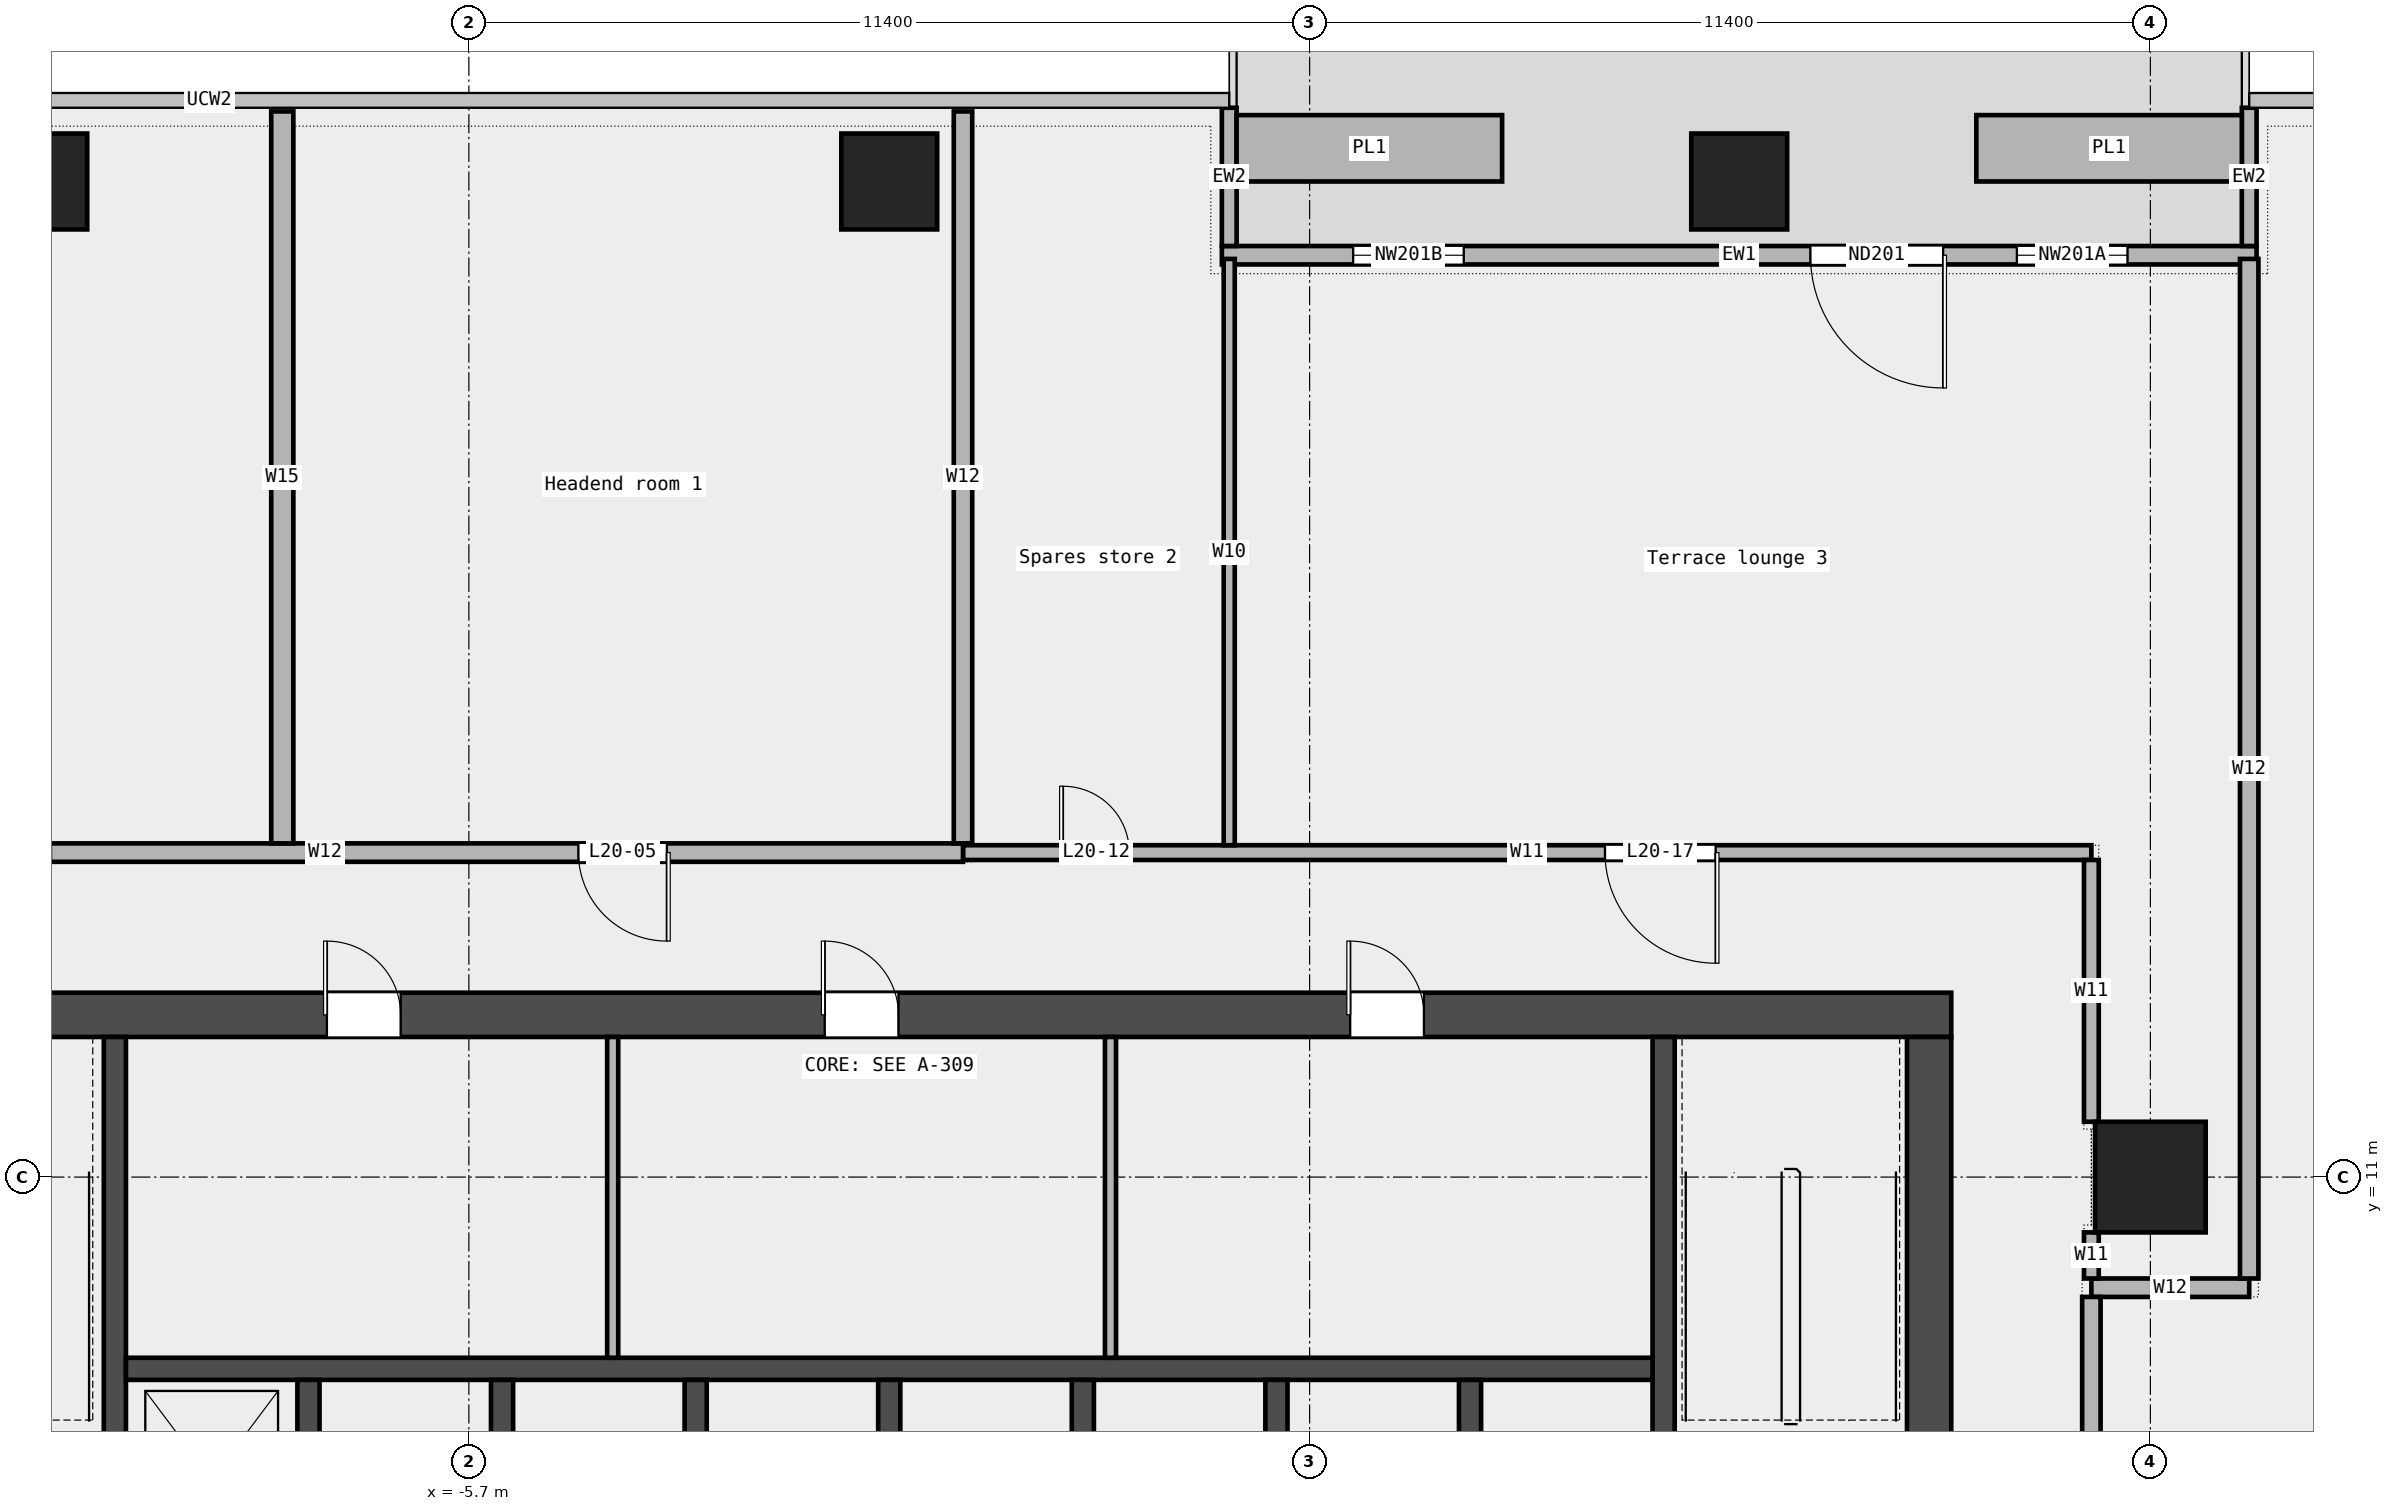
"""IFC4 building model, lengths in metres.
Left out: names, types, materials, properties, quantities, classifications, styles, units other than length and angle.
Written with IfcOpenShell. Run it as: python <this file> out.ifc"""

import sys

from ifc_helpers import new_model, si_unit, direction, frame, frame_2d, origin, origin_2d, place, context, subcontext, project, spatial, rectangle, extrude, element, fill, save


model = new_model("IFC4")
c1 = context("Model", 3, precision=1e-05, world=origin(), true_north=direction((0.0, 1.0)))
c2 = subcontext(c1, "Body", "Model", "MODEL_VIEW")
j1 = project(units=[si_unit("LENGTHUNIT", "METRE"), si_unit("PLANEANGLEUNIT", "RADIAN")], contexts=[c1])
p1 = place(None, origin())
s1 = spatial("IfcSite", under=j1, at=p1, CompositionType="ELEMENT")
p2 = place(p1, origin())
s2 = spatial("IfcBuilding", under=s1, at=p2, CompositionType="ELEMENT")
p3 = place(p2, frame((0.0, 0.0, 103.6)))
s3 = spatial("IfcBuildingStorey", under=s2, at=p3, CompositionType="ELEMENT", Elevation=103.6)
for number, where, z_axis, x_axis in (
    (1, (11.525, 24.5, 0.0), (0.0, 0.0, 1.0), (1.0, 0.0, 0.0)),
    (2, (0.0, 24.5, 0.0), (0.0, 0.0, 1.0), (1.0, 0.0, 0.0)),
    (3, (-11.525, 24.5, 0.0), (0.0, 0.0, 1.0), (1.0, 0.0, 0.0)),
):
    element("IfcColumn", number, at=place(p3, frame(where, z_axis=z_axis, x_axis=x_axis)), inside=s3, PredefinedType="COLUMN", context=c2, shape_type="SweptSolid", body=[
        extrude(rectangle(XDim=1.3, YDim=1.3, at=origin_2d()), origin(), (0.0, 0.0, 1.0), 4.05),
    ])
p4 = place(p3, frame((17.1, 11.0, 0.0), z_axis=(0.0, 0.0, 1.0), x_axis=(1.0, 0.0, 0.0)))
e4 = element("IfcColumn", 4, at=p4, inside=s3, PredefinedType="COLUMN", context=c2, shape_type="SweptSolid", body=[
    extrude(rectangle(XDim=1.5, YDim=1.5, at=origin_2d()), origin(), (0.0, 0.0, 1.0), 4.05),
])
p5 = place(p3, frame((18.54, 23.5, 0.0), z_axis=(0.0, 0.0, 1.0), x_axis=(-1.0, 0.0, 0.0)))
e5 = element("IfcWall", 5, at=p5, inside=s3, PredefinedType="STANDARD", context=c2, shape_type="SweptSolid", body=[
    extrude(rectangle(XDim=14.03, YDim=0.25, at=frame_2d((7.015, 0.0))), origin(), (0.0, 0.0, 1.0), 4.05),
])
p6 = place(p5, frame((1.75, 0.0, 0.45)))
e6 = element("IfcOpeningElement", 6, at=p6, cuts=e5, PredefinedType="OPENING", context=c2, shape_type="SweptSolid", body=[
    extrude(rectangle(XDim=1.5, YDim=3.0, at=frame_2d((0.75, 1.5))), frame((0.0, 0.137, 0.0), z_axis=(0.0, -1.0, 0.0), x_axis=(1.0, 0.0, 0.0)), (0.0, 0.0, 1.0), 0.274),
])
p7 = place(p5, frame((4.25, 0.0, 0.0)))
e7 = element("IfcOpeningElement", 7, at=p7, cuts=e5, PredefinedType="OPENING", context=c2, shape_type="SweptSolid", body=[
    extrude(rectangle(XDim=1.8, YDim=2.4, at=frame_2d((0.9, 1.2))), frame((0.0, 0.137, 0.0), z_axis=(0.0, -1.0, 0.0), x_axis=(1.0, 0.0, 0.0)), (0.0, 0.0, 1.0), 0.274),
])
p8 = place(p5, frame((10.75, 0.0, 0.45)))
e8 = element("IfcOpeningElement", 8, at=p8, cuts=e5, PredefinedType="OPENING", context=c2, shape_type="SweptSolid", body=[
    extrude(rectangle(XDim=1.5, YDim=3.0, at=frame_2d((0.75, 1.5))), frame((0.0, 0.137, 0.0), z_axis=(0.0, -1.0, 0.0), x_axis=(1.0, 0.0, 0.0)), (0.0, 0.0, 1.0), 0.274),
])
for number, where, z_axis, x_axis in (
    (9, (18.44, 25.5, 0.0), (0.0, 0.0, 1.0), (0.0, -1.0, 0.0)),
    (10, (4.61, 25.5, 0.0), (0.0, 0.0, 1.0), (0.0, -1.0, 0.0)),
):
    element("IfcWall", number, at=place(p3, frame(where, z_axis=z_axis, x_axis=x_axis)), inside=s3, PredefinedType="STANDARD", context=c2, shape_type="SweptSolid", body=[
        extrude(rectangle(XDim=1.875, YDim=0.2, at=frame_2d((0.938, 0.0))), origin(), (0.0, 0.0, 1.0), 4.05),
    ])
for number, where, z_axis, x_axis in (
    (11, (18.34, 24.95, 0.0), (0.0, 0.0, 1.0), (-1.0, 0.0, 0.0)),
    (12, (8.31, 24.95, 0.0), (0.0, 0.0, 1.0), (-1.0, 0.0, 0.0)),
):
    element("IfcWall", number, at=place(p3, frame(where, z_axis=z_axis, x_axis=x_axis)), inside=s3, PredefinedType="STANDARD", context=c2, shape_type="SweptSolid", body=[
        extrude(rectangle(XDim=3.6, YDim=0.9, at=frame_2d((1.8, 0.0))), origin(), (0.0, 0.0, 1.0), 0.7),
    ])
p9 = place(p3, frame((16.3, 9.5, 0.0), z_axis=(0.0, 0.0, 1.0), x_axis=(1.0, 0.0, 0.0)))
e13 = element("IfcWall", 13, at=p9, inside=s3, PredefinedType="PARTITIONING", context=c2, shape_type="SweptSolid", body=[
    extrude(rectangle(XDim=2.14, YDim=0.25, at=frame_2d((1.07, 0.0))), origin(), (0.0, 0.0, 1.0), 4.05),
])
p10 = place(p3, frame((1.0, 15.4, 0.0), z_axis=(0.0, 0.0, 1.0), x_axis=(1.0, 0.0, 0.0)))
e14 = element("IfcWall", 14, at=p10, inside=s3, PredefinedType="PARTITIONING", context=c2, shape_type="SweptSolid", body=[
    extrude(rectangle(XDim=15.3, YDim=0.2, at=frame_2d((7.65, 0.0))), origin(), (0.0, 0.0, 1.0), 4.05),
])
p11 = place(p10, frame((1.355, 0.0, 0.0)))
e15 = element("IfcOpeningElement", 15, at=p11, cuts=e14, PredefinedType="OPENING", context=c2, shape_type="SweptSolid", body=[
    extrude(rectangle(XDim=0.9, YDim=2.1, at=frame_2d((0.45, 1.05))), frame((0.0, 0.112, 0.0), z_axis=(0.0, -1.0, 0.0), x_axis=(1.0, 0.0, 0.0)), (0.0, 0.0, 1.0), 0.224),
])
p12 = place(p10, frame((8.705, 0.0, 0.0)))
e16 = element("IfcOpeningElement", 16, at=p12, cuts=e14, PredefinedType="OPENING", context=c2, shape_type="SweptSolid", body=[
    extrude(rectangle(XDim=1.5, YDim=2.1, at=frame_2d((0.75, 1.05))), frame((0.0, 0.112, 0.0), z_axis=(0.0, -1.0, 0.0), x_axis=(1.0, 0.0, 0.0)), (0.0, 0.0, 1.0), 0.224),
])
p13 = place(p3, frame((-16.3, 15.4, 0.0), z_axis=(0.0, 0.0, 1.0), x_axis=(1.0, 0.0, 0.0)))
e17 = element("IfcWall", 17, at=p13, inside=s3, PredefinedType="PARTITIONING", context=c2, shape_type="SweptSolid", body=[
    extrude(rectangle(XDim=17.3, YDim=0.25, at=frame_2d((8.65, 0.0))), origin(), (0.0, 0.0, 1.0), 4.05),
])
p14 = place(p13, frame((12.085, 0.0, 0.0)))
e18 = element("IfcOpeningElement", 18, at=p14, cuts=e17, PredefinedType="OPENING", context=c2, shape_type="SweptSolid", body=[
    extrude(rectangle(XDim=1.2, YDim=2.1, at=frame_2d((0.6, 1.05))), frame((0.0, 0.137, 0.0), z_axis=(0.0, -1.0, 0.0), x_axis=(1.0, 0.0, 0.0)), (0.0, 0.0, 1.0), 0.274),
])
p15 = place(p13, frame((3.135, 0.0, 0.0)))
e19 = element("IfcOpeningElement", 19, at=p15, cuts=e17, PredefinedType="OPENING", context=c2, shape_type="SweptSolid", body=[
    extrude(rectangle(XDim=1.8, YDim=2.1, at=frame_2d((0.9, 1.05))), frame((0.0, 0.137, 0.0), z_axis=(0.0, -1.0, 0.0), x_axis=(1.0, 0.0, 0.0)), (0.0, 0.0, 1.0), 0.274),
])
p16 = place(p3, frame((-8.23, 15.525, 0.0), z_axis=(0.0, 0.0, 1.0), x_axis=(0.0, 1.0, 0.0)))
e20 = element("IfcWall", 20, at=p16, inside=s3, PredefinedType="PARTITIONING", context=c2, shape_type="SweptSolid", body=[
    extrude(rectangle(XDim=9.925, YDim=0.3, at=frame_2d((4.962, 0.0))), origin(), (0.0, 0.0, 1.0), 4.05),
])
p17 = place(p3, frame((1.0, 15.525, 0.0), z_axis=(0.0, 0.0, 1.0), x_axis=(0.0, 1.0, 0.0)))
e21 = element("IfcWall", 21, at=p17, inside=s3, PredefinedType="PARTITIONING", context=c2, shape_type="SweptSolid", body=[
    extrude(rectangle(XDim=9.925, YDim=0.25, at=frame_2d((4.962, 0.0))), origin(), (0.0, 0.0, 1.0), 4.05),
])
p18 = place(p3, frame((4.61, 15.5, 0.0), z_axis=(0.0, 0.0, 1.0), x_axis=(0.0, 1.0, 0.0)))
e22 = element("IfcWall", 22, at=p18, inside=s3, PredefinedType="PARTITIONING", context=c2, shape_type="SweptSolid", body=[
    extrude(rectangle(XDim=7.95, YDim=0.15, at=frame_2d((3.975, 0.0))), origin(), (0.0, 0.0, 1.0), 4.05),
])
p19 = place(p3, frame((16.3, 9.625, 0.0), z_axis=(0.0, 0.0, 1.0), x_axis=(0.0, 1.0, 0.0)))
e23 = element("IfcWall", 23, at=p19, inside=s3, PredefinedType="PARTITIONING", context=c2, shape_type="SweptSolid", body=[
    extrude(rectangle(XDim=0.625, YDim=0.2, at=frame_2d((0.312, 0.0))), origin(), (0.0, 0.0, 1.0), 4.05),
])
p20 = place(p3, frame((16.3, 11.75, 0.0), z_axis=(0.0, 0.0, 1.0), x_axis=(0.0, 1.0, 0.0)))
e24 = element("IfcWall", 24, at=p20, inside=s3, PredefinedType="PARTITIONING", context=c2, shape_type="SweptSolid", body=[
    extrude(rectangle(XDim=3.55, YDim=0.2, at=frame_2d((1.775, 0.0))), origin(), (0.0, 0.0, 1.0), 4.05),
])
p21 = place(p3, frame((16.3, 1.525, 0.0), z_axis=(0.0, 0.0, 1.0), x_axis=(0.0, 1.0, 0.0)))
e25 = element("IfcWall", 25, at=p21, inside=s3, PredefinedType="PARTITIONING", context=c2, shape_type="SweptSolid", body=[
    extrude(rectangle(XDim=7.85, YDim=0.25, at=frame_2d((3.925, 0.0))), origin(), (0.0, 0.0, 1.0), 4.05),
])
p22 = place(p21, frame((2.538, 0.0, 0.0)))
e26 = element("IfcOpeningElement", 26, at=p22, cuts=e25, PredefinedType="OPENING", context=c2, shape_type="SweptSolid", body=[
    extrude(rectangle(XDim=1.8, YDim=2.1, at=frame_2d((0.9, 1.05))), frame((0.0, 0.137, 0.0), z_axis=(0.0, -1.0, 0.0), x_axis=(1.0, 0.0, 0.0)), (0.0, 0.0, 1.0), 0.274),
])
p23 = place(p3, frame((18.44, 9.625, 0.0), z_axis=(0.0, 0.0, 1.0), x_axis=(0.0, 1.0, 0.0)))
e27 = element("IfcWall", 27, at=p23, inside=s3, PredefinedType="PARTITIONING", context=c2, shape_type="SweptSolid", body=[
    extrude(rectangle(XDim=13.825, YDim=0.25, at=frame_2d((6.913, 0.0))), origin(), (0.0, 0.0, 1.0), 4.05),
])
p24 = place(p3, frame((-14.4, 13.2, 0.0), z_axis=(0.0, 0.0, 1.0), x_axis=(1.0, 0.0, 0.0)))
e28 = element("IfcWall", 28, at=p24, inside=s3, PredefinedType="SHEAR", context=c2, shape_type="SweptSolid", body=[
    extrude(rectangle(XDim=28.8, YDim=0.6, at=frame_2d((14.4, 0.0))), origin(), (0.0, 0.0, 1.0), 4.2),
])
p25 = place(p24, frame((6.775, 0.0, 0.0)))
e29 = element("IfcOpeningElement", 29, at=p25, cuts=e28, PredefinedType="OPENING", context=c2, shape_type="SweptSolid", body=[
    extrude(rectangle(XDim=1.0, YDim=2.1, at=frame_2d((0.5, 1.05))), frame((0.0, 0.312, 0.0), z_axis=(0.0, -1.0, 0.0), x_axis=(1.0, 0.0, 0.0)), (0.0, 0.0, 1.0), 0.624),
])
p26 = place(p24, frame((13.525, 0.0, 0.0)))
e30 = element("IfcOpeningElement", 30, at=p26, cuts=e28, PredefinedType="OPENING", context=c2, shape_type="SweptSolid", body=[
    extrude(rectangle(XDim=1.0, YDim=2.1, at=frame_2d((0.5, 1.05))), frame((0.0, 0.312, 0.0), z_axis=(0.0, -1.0, 0.0), x_axis=(1.0, 0.0, 0.0)), (0.0, 0.0, 1.0), 0.624),
])
p27 = place(p24, frame((20.65, 0.0, 0.0)))
e31 = element("IfcOpeningElement", 31, at=p27, cuts=e28, PredefinedType="OPENING", context=c2, shape_type="SweptSolid", body=[
    extrude(rectangle(XDim=1.0, YDim=2.1, at=frame_2d((0.5, 1.05))), frame((0.0, 0.312, 0.0), z_axis=(0.0, -1.0, 0.0), x_axis=(1.0, 0.0, 0.0)), (0.0, 0.0, 1.0), 0.624),
])
p28 = place(p3, frame((14.1, -6.6, 0.0), z_axis=(0.0, 0.0, 1.0), x_axis=(0.0, 1.0, 0.0)))
e32 = element("IfcWall", 32, at=p28, inside=s3, PredefinedType="SHEAR", context=c2, shape_type="SweptSolid", body=[
    extrude(rectangle(XDim=19.5, YDim=0.6, at=frame_2d((9.75, 0.0))), origin(), (0.0, 0.0, 1.0), 4.2),
])
p29 = place(p28, frame((9.3, 0.0, 0.0)))
e33 = element("IfcOpeningElement", 33, at=p29, cuts=e32, PredefinedType="OPENING", context=c2, shape_type="SweptSolid", body=[
    extrude(rectangle(XDim=1.8, YDim=2.1, at=frame_2d((0.9, 1.05))), frame((0.0, 0.312, 0.0), z_axis=(0.0, -1.0, 0.0), x_axis=(1.0, 0.0, 0.0)), (0.0, 0.0, 1.0), 0.624),
])
for number, where, z_axis, x_axis in (
    (34, (-10.5, 5.25, 0.0), (0.0, 0.0, 1.0), (0.0, 1.0, 0.0)),
    (35, (10.5, 5.25, 0.0), (0.0, 0.0, 1.0), (0.0, 1.0, 0.0)),
):
    element("IfcWall", number, at=place(p3, frame(where, z_axis=z_axis, x_axis=x_axis)), inside=s3, PredefinedType="SHEAR", context=c2, shape_type="SweptSolid", body=[
        extrude(rectangle(XDim=7.65, YDim=0.3, at=frame_2d((3.825, 0.0))), origin(), (0.0, 0.0, 1.0), 4.2),
    ])
p30 = place(p3, frame((-10.35, 8.4, 0.0), z_axis=(0.0, 0.0, 1.0), x_axis=(1.0, 0.0, 0.0)))
e36 = element("IfcWall", 36, at=p30, inside=s3, PredefinedType="SOLIDWALL", context=c2, shape_type="SweptSolid", body=[
    extrude(rectangle(XDim=20.7, YDim=0.3, at=frame_2d((10.35, 0.0))), origin(), (0.0, 0.0, 1.0), 4.2),
])
for number, where, z_axis, x_axis in (
    (37, (-7.875, 5.55, 0.0), (0.0, 0.0, 1.0), (0.0, 1.0, 0.0)),
    (38, (-5.25, 5.55, 0.0), (0.0, 0.0, 1.0), (0.0, 1.0, 0.0)),
    (39, (-2.625, 5.55, 0.0), (0.0, 0.0, 1.0), (0.0, 1.0, 0.0)),
    (40, (0.0, 5.55, 0.0), (0.0, 0.0, 1.0), (0.0, 1.0, 0.0)),
    (41, (2.625, 5.55, 0.0), (0.0, 0.0, 1.0), (0.0, 1.0, 0.0)),
    (42, (5.25, 5.55, 0.0), (0.0, 0.0, 1.0), (0.0, 1.0, 0.0)),
    (43, (7.875, 5.55, 0.0), (0.0, 0.0, 1.0), (0.0, 1.0, 0.0)),
):
    element("IfcWall", number, at=place(p3, frame(where, z_axis=z_axis, x_axis=x_axis)), inside=s3, PredefinedType="SOLIDWALL", context=c2, shape_type="SweptSolid", body=[
        extrude(rectangle(XDim=2.7, YDim=0.3, at=frame_2d((1.35, 0.0))), origin(), (0.0, 0.0, 1.0), 4.2),
    ])
for number, where, z_axis, x_axis in (
    (44, (-3.75, 8.55, 0.0), (0.0, 0.0, 1.0), (0.0, 1.0, 0.0)),
    (45, (3.0, 8.55, 0.0), (0.0, 0.0, 1.0), (0.0, 1.0, 0.0)),
):
    element("IfcWall", number, at=place(p3, frame(where, z_axis=z_axis, x_axis=x_axis)), inside=s3, PredefinedType="PARTITIONING", context=c2, shape_type="SweptSolid", body=[
        extrude(rectangle(XDim=4.35, YDim=0.15, at=frame_2d((2.175, 0.0))), origin(), (0.0, 0.0, 1.0), 4.2),
    ])
p31 = place(p6, origin())
e46 = element("IfcWindow", 46, at=p31, inside=s3, PartitioningType="SINGLE_PANEL", PredefinedType="WINDOW", context=c2, shape_type="SweptSolid", body=[
    extrude(rectangle(XDim=1.5, YDim=3.0, at=frame_2d((0.75, 1.5))), frame((0.0, 0.03, 0.0), z_axis=(0.0, -1.0, 0.0), x_axis=(1.0, 0.0, 0.0)), (0.0, 0.0, 1.0), 0.06),
])
fill(e6, e46)
p32 = place(p7, origin())
e47 = element("IfcDoor", 47, at=p32, inside=s3, OperationType="DOUBLE_DOOR_SINGLE_SWING", PredefinedType="DOOR", context=c2, shape_type="SweptSolid", body=[
    extrude(rectangle(XDim=1.8, YDim=2.4, at=frame_2d((0.9, 1.2))), frame((0.0, 0.025, 0.0), z_axis=(0.0, -1.0, 0.0), x_axis=(1.0, 0.0, 0.0)), (0.0, 0.0, 1.0), 0.05),
])
fill(e7, e47)
p33 = place(p8, origin())
e48 = element("IfcWindow", 48, at=p33, inside=s3, PartitioningType="SINGLE_PANEL", PredefinedType="WINDOW", context=c2, shape_type="SweptSolid", body=[
    extrude(rectangle(XDim=1.5, YDim=3.0, at=frame_2d((0.75, 1.5))), frame((0.0, 0.03, 0.0), z_axis=(0.0, -1.0, 0.0), x_axis=(1.0, 0.0, 0.0)), (0.0, 0.0, 1.0), 0.06),
])
fill(e8, e48)
p34 = place(p14, origin())
e49 = element("IfcDoor", 49, at=p34, inside=s3, OperationType="SINGLE_SWING_LEFT", PredefinedType="DOOR", context=c2, shape_type="SweptSolid", body=[
    extrude(rectangle(XDim=1.2, YDim=2.1, at=frame_2d((0.6, 1.05))), frame((0.0, 0.025, 0.0), z_axis=(0.0, -1.0, 0.0), x_axis=(1.0, 0.0, 0.0)), (0.0, 0.0, 1.0), 0.05),
])
fill(e18, e49)
p35 = place(p11, origin())
e50 = element("IfcDoor", 50, at=p35, inside=s3, OperationType="SINGLE_SWING_LEFT", PredefinedType="DOOR", context=c2, shape_type="SweptSolid", body=[
    extrude(rectangle(XDim=0.9, YDim=2.1, at=frame_2d((0.45, 1.05))), frame((0.0, 0.025, 0.0), z_axis=(0.0, -1.0, 0.0), x_axis=(1.0, 0.0, 0.0)), (0.0, 0.0, 1.0), 0.05),
])
fill(e15, e50)
p36 = place(p12, origin())
e51 = element("IfcDoor", 51, at=p36, inside=s3, OperationType="DOUBLE_DOOR_SINGLE_SWING", PredefinedType="DOOR", context=c2, shape_type="SweptSolid", body=[
    extrude(rectangle(XDim=1.5, YDim=2.1, at=frame_2d((0.75, 1.05))), frame((0.0, 0.025, 0.0), z_axis=(0.0, -1.0, 0.0), x_axis=(1.0, 0.0, 0.0)), (0.0, 0.0, 1.0), 0.05),
])
fill(e16, e51)
p37 = place(p25, origin())
e52 = element("IfcDoor", 52, at=p37, inside=s3, OperationType="SINGLE_SWING_LEFT", PredefinedType="DOOR", context=c2, shape_type="SweptSolid", body=[
    extrude(rectangle(XDim=1.0, YDim=2.1, at=frame_2d((0.5, 1.05))), frame((0.0, 0.025, 0.0), z_axis=(0.0, -1.0, 0.0), x_axis=(1.0, 0.0, 0.0)), (0.0, 0.0, 1.0), 0.05),
])
fill(e29, e52)
p38 = place(p26, origin())
e53 = element("IfcDoor", 53, at=p38, inside=s3, OperationType="SINGLE_SWING_LEFT", PredefinedType="DOOR", context=c2, shape_type="SweptSolid", body=[
    extrude(rectangle(XDim=1.0, YDim=2.1, at=frame_2d((0.5, 1.05))), frame((0.0, 0.025, 0.0), z_axis=(0.0, -1.0, 0.0), x_axis=(1.0, 0.0, 0.0)), (0.0, 0.0, 1.0), 0.05),
])
fill(e30, e53)
p39 = place(p27, origin())
e54 = element("IfcDoor", 54, at=p39, inside=s3, OperationType="SINGLE_SWING_LEFT", PredefinedType="DOOR", context=c2, shape_type="SweptSolid", body=[
    extrude(rectangle(XDim=1.0, YDim=2.1, at=frame_2d((0.5, 1.05))), frame((0.0, 0.025, 0.0), z_axis=(0.0, -1.0, 0.0), x_axis=(1.0, 0.0, 0.0)), (0.0, 0.0, 1.0), 0.05),
])
fill(e31, e54)
save(model, sys.argv[1])
